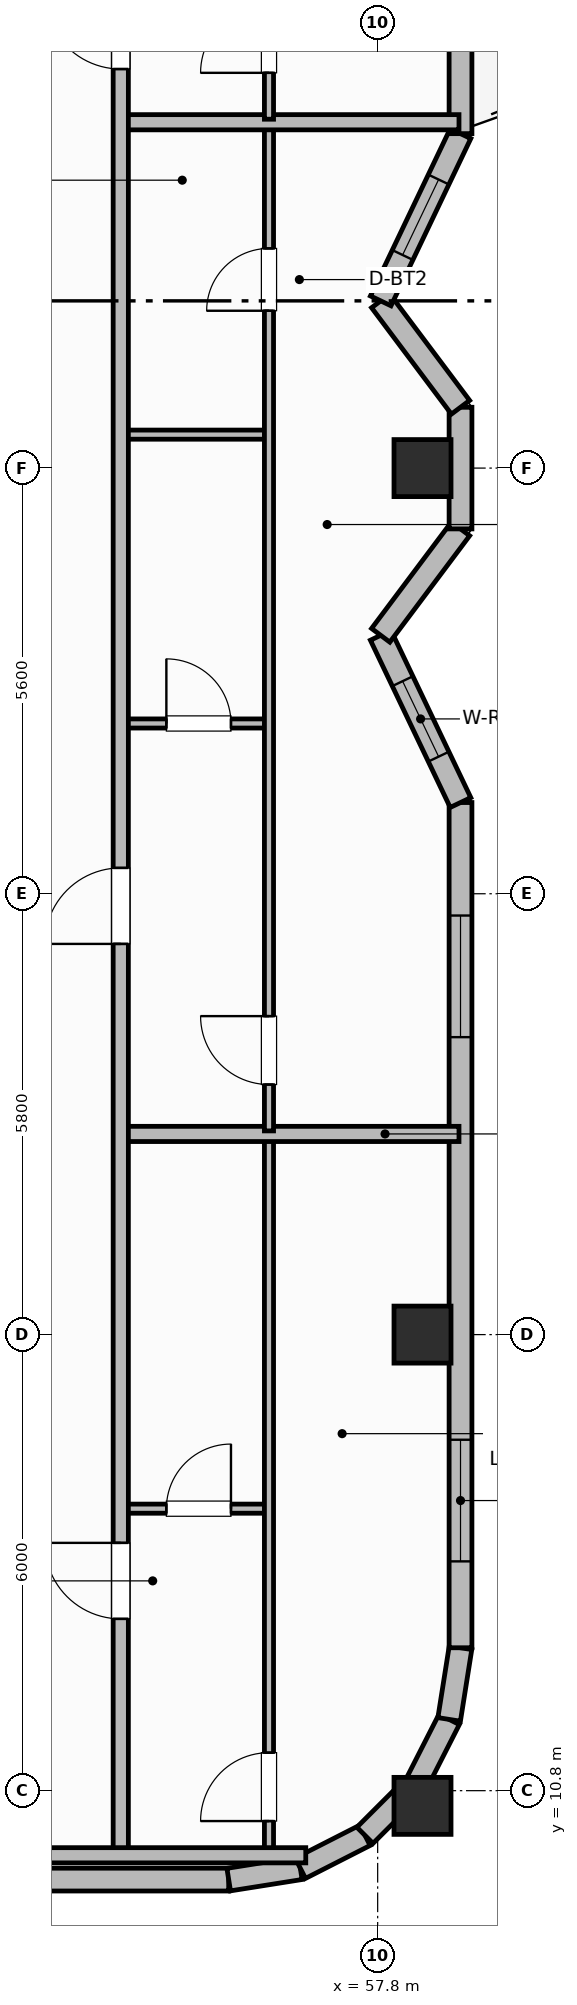
"""IFC4 building model, lengths in metres.
Left out: names, types, materials, properties, quantities, classifications, styles, units other than length and angle.
Written with IfcOpenShell. Run it as: python <this file> out.ifc"""

import sys

from ifc_helpers import new_model, si_unit, direction, frame, frame_2d, origin, origin_2d, place, context, subcontext, project, spatial, rectangle, extrude, element, fill, save


model = new_model("IFC4")
c1 = context("Model", 3, precision=1e-05, world=origin(), true_north=direction((0.0, 1.0)))
c2 = subcontext(c1, "Body", "Model", "MODEL_VIEW")
j1 = project(units=[si_unit("LENGTHUNIT", "METRE"), si_unit("PLANEANGLEUNIT", "RADIAN")], contexts=[c1])
p1 = place(None, origin())
s1 = spatial("IfcSite", under=j1, at=p1, CompositionType="ELEMENT")
p2 = place(p1, origin())
s2 = spatial("IfcBuilding", under=s1, at=p2, CompositionType="ELEMENT")
p3 = place(p2, frame((0.0, 0.0, 278.7)))
s3 = spatial("IfcBuildingStorey", under=s2, at=p3, CompositionType="ELEMENT", Elevation=278.7)
for number, where, z_axis, x_axis in (
    (1, (58.39, 10.6, 0.0), (0.0, 0.0, 1.0), (1.0, 0.0, 0.0)),
    (2, (58.39, 16.8, 0.0), (0.0, 0.0, 1.0), (1.0, 0.0, 0.0)),
    (3, (58.39, 28.2, 0.0), (0.0, 0.0, 1.0), (1.0, 0.0, 0.0)),
):
    element("IfcColumn", number, at=place(p3, frame(where, z_axis=z_axis, x_axis=x_axis)), inside=s3, PredefinedType="COLUMN", context=c2, shape_type="SweptSolid", body=[
        extrude(rectangle(XDim=0.75, YDim=0.75, at=origin_2d()), origin(), (0.0, 0.0, 1.0), 3.7),
    ])
p4 = place(p3, frame((22.56, 9.63, 0.0), z_axis=(0.0, 0.0, 1.0), x_axis=(1.0, 0.0, 0.0)))
e4 = element("IfcWall", 4, at=p4, inside=s3, PredefinedType="SOLIDWALL", context=c2, shape_type="SweptSolid", body=[
    extrude(rectangle(XDim=33.28, YDim=0.3, at=frame_2d((16.64, 0.0))), origin(), (0.0, 0.0, 1.0), 2.73),
])
p5 = place(p4, frame((5.08, 0.0, 0.76)))
e5 = element("IfcOpeningElement", 5, at=p5, cuts=e4, PredefinedType="OPENING", context=c2, shape_type="SweptSolid", body=[
    extrude(rectangle(XDim=1.8, YDim=1.85, at=frame_2d((0.9, 0.925))), frame((0.0, 0.16, 0.0), z_axis=(0.0, -1.0, 0.0), x_axis=(1.0, 0.0, 0.0)), (0.0, 0.0, 1.0), 0.32),
])
p6 = place(p4, frame((8.633, 0.0, 0.76)))
e6 = element("IfcOpeningElement", 6, at=p6, cuts=e4, PredefinedType="OPENING", context=c2, shape_type="SweptSolid", body=[
    extrude(rectangle(XDim=1.8, YDim=1.85, at=frame_2d((0.9, 0.925))), frame((0.0, 0.16, 0.0), z_axis=(0.0, -1.0, 0.0), x_axis=(1.0, 0.0, 0.0)), (0.0, 0.0, 1.0), 0.32),
])
p7 = place(p4, frame((15.74, 0.0, 0.76)))
e7 = element("IfcOpeningElement", 7, at=p7, cuts=e4, PredefinedType="OPENING", context=c2, shape_type="SweptSolid", body=[
    extrude(rectangle(XDim=1.8, YDim=1.85, at=frame_2d((0.9, 0.925))), frame((0.0, 0.16, 0.0), z_axis=(0.0, -1.0, 0.0), x_axis=(1.0, 0.0, 0.0)), (0.0, 0.0, 1.0), 0.32),
])
p8 = place(p4, frame((22.847, 0.0, 0.76)))
e8 = element("IfcOpeningElement", 8, at=p8, cuts=e4, PredefinedType="OPENING", context=c2, shape_type="SweptSolid", body=[
    extrude(rectangle(XDim=1.8, YDim=1.85, at=frame_2d((0.9, 0.925))), frame((0.0, 0.16, 0.0), z_axis=(0.0, -1.0, 0.0), x_axis=(1.0, 0.0, 0.0)), (0.0, 0.0, 1.0), 0.32),
])
p9 = place(p4, frame((26.4, 0.0, 0.76)))
e9 = element("IfcOpeningElement", 9, at=p9, cuts=e4, PredefinedType="OPENING", context=c2, shape_type="SweptSolid", body=[
    extrude(rectangle(XDim=1.8, YDim=1.85, at=frame_2d((0.9, 0.925))), frame((0.0, 0.16, 0.0), z_axis=(0.0, -1.0, 0.0), x_axis=(1.0, 0.0, 0.0)), (0.0, 0.0, 1.0), 0.32),
])
p10 = place(p3, frame((55.84, 9.63, 0.0), z_axis=(0.0, 0.0, 1.0), x_axis=(0.987663181641, 0.156593229835, 0.0)))
e10 = element("IfcWall", 10, at=p10, inside=s3, PredefinedType="SOLIDWALL", context=c2, shape_type="SweptSolid", body=[
    extrude(rectangle(XDim=0.954, YDim=0.3, at=frame_2d((0.477, 0.0))), origin(), (0.0, 0.0, 1.0), 2.73),
])
for number, where, z_axis, x_axis in (
    (11, (56.782, 9.779, 0.0), (0.0, 0.0, 1.0), (0.891, 0.454, 0.0)),
    (12, (57.633, 10.212, 0.0), (0.0, 0.0, 1.0), (0.707, 0.707, 0.0)),
    (13, (58.308, 10.887, 0.0), (0.0, 0.0, 1.0), (0.454, 0.891, 0.0)),
):
    element("IfcWall", number, at=place(p3, frame(where, z_axis=z_axis, x_axis=x_axis)), inside=s3, PredefinedType="SOLIDWALL", context=c2, shape_type="SweptSolid", body=[
        extrude(rectangle(XDim=0.954, YDim=0.3, at=frame_2d((0.477, 0.0))), origin(), (0.0, 0.0, 1.0), 2.73),
    ])
p11 = place(p3, frame((58.741, 11.738, 0.0), z_axis=(0.0, 0.0, 1.0), x_axis=(0.156343617883, 0.987702725088, 0.0)))
e14 = element("IfcWall", 14, at=p11, inside=s3, PredefinedType="SOLIDWALL", context=c2, shape_type="SweptSolid", body=[
    extrude(rectangle(XDim=0.954, YDim=0.3, at=frame_2d((0.477, 0.0))), origin(), (0.0, 0.0, 1.0), 2.73),
])
p12 = place(p3, frame((58.89, 12.68, 0.0), z_axis=(0.0, 0.0, 1.0), x_axis=(0.0, 1.0, 0.0)))
e15 = element("IfcWall", 15, at=p12, inside=s3, PredefinedType="SOLIDWALL", context=c2, shape_type="SweptSolid", body=[
    extrude(rectangle(XDim=11.12, YDim=0.3, at=frame_2d((5.56, 0.0))), origin(), (0.0, 0.0, 1.0), 2.73),
])
p13 = place(p12, frame((1.137, 0.0, 0.71)))
e16 = element("IfcOpeningElement", 16, at=p13, cuts=e15, PredefinedType="OPENING", context=c2, shape_type="SweptSolid", body=[
    extrude(rectangle(XDim=1.6, YDim=1.9, at=frame_2d((0.8, 0.95))), frame((0.0, 0.16, 0.0), z_axis=(0.0, -1.0, 0.0), x_axis=(1.0, 0.0, 0.0)), (0.0, 0.0, 1.0), 0.32),
])
p14 = place(p12, frame((8.033, 0.0, 0.71)))
e17 = element("IfcOpeningElement", 17, at=p14, cuts=e15, PredefinedType="OPENING", context=c2, shape_type="SweptSolid", body=[
    extrude(rectangle(XDim=1.6, YDim=1.9, at=frame_2d((0.8, 0.95))), frame((0.0, 0.16, 0.0), z_axis=(0.0, -1.0, 0.0), x_axis=(1.0, 0.0, 0.0)), (0.0, 0.0, 1.0), 0.32),
])
p15 = place(p3, frame((58.89, 23.8, 0.0), z_axis=(0.0, 0.0, 1.0), x_axis=(-0.430672112392, 0.902508466225, 0.0)))
e18 = element("IfcWall", 18, at=p15, inside=s3, PredefinedType="SOLIDWALL", context=c2, shape_type="SweptSolid", body=[
    extrude(rectangle(XDim=2.438, YDim=0.3, at=frame_2d((1.219, 0.0))), origin(), (0.0, 0.0, 1.0), 2.73),
])
p16 = place(p15, frame((0.669, 0.0, 0.92)))
e19 = element("IfcOpeningElement", 19, at=p16, cuts=e18, PredefinedType="OPENING", context=c2, shape_type="SweptSolid", body=[
    extrude(rectangle(XDim=1.1, YDim=1.65, at=frame_2d((0.55, 0.825))), frame((0.0, 0.16, 0.0), z_axis=(0.0, -1.0, 0.0), x_axis=(1.0, 0.0, 0.0)), (0.0, 0.0, 1.0), 0.32),
])
p17 = place(p3, frame((57.84, 26.0, 0.0), z_axis=(0.0, 0.0, 1.0), x_axis=(0.599955351225, 0.800033484634, 0.0)))
e20 = element("IfcWall", 20, at=p17, inside=s3, PredefinedType="SOLIDWALL", context=c2, shape_type="SweptSolid", body=[
    extrude(rectangle(XDim=1.75, YDim=0.3, at=frame_2d((0.875, 0.0))), origin(), (0.0, 0.0, 1.0), 2.73),
])
p18 = place(p3, frame((58.89, 27.4, 0.0), z_axis=(0.0, 0.0, 1.0), x_axis=(0.0, 1.0, 0.0)))
e21 = element("IfcWall", 21, at=p18, inside=s3, PredefinedType="SOLIDWALL", context=c2, shape_type="SweptSolid", body=[
    extrude(rectangle(XDim=1.6, YDim=0.3, at=frame_2d((0.8, 0.0))), origin(), (0.0, 0.0, 1.0), 2.73),
])
p19 = place(p3, frame((58.89, 29.0, 0.0), z_axis=(0.0, 0.0, 1.0), x_axis=(-0.599955351225, 0.800033484634, 0.0)))
e22 = element("IfcWall", 22, at=p19, inside=s3, PredefinedType="SOLIDWALL", context=c2, shape_type="SweptSolid", body=[
    extrude(rectangle(XDim=1.75, YDim=0.3, at=frame_2d((0.875, 0.0))), origin(), (0.0, 0.0, 1.0), 2.73),
])
p20 = place(p3, frame((57.84, 30.4, 0.0), z_axis=(0.0, 0.0, 1.0), x_axis=(0.430633186234, 0.902527040544, 0.0)))
e23 = element("IfcWall", 23, at=p20, inside=s3, PredefinedType="SOLIDWALL", context=c2, shape_type="SweptSolid", body=[
    extrude(rectangle(XDim=2.438, YDim=0.3, at=frame_2d((1.219, 0.0))), origin(), (0.0, 0.0, 1.0), 2.73),
])
p21 = place(p20, frame((0.669, 0.0, 0.92)))
e24 = element("IfcOpeningElement", 24, at=p21, cuts=e23, PredefinedType="OPENING", context=c2, shape_type="SweptSolid", body=[
    extrude(rectangle(XDim=1.1, YDim=1.65, at=frame_2d((0.55, 0.825))), frame((0.0, 0.16, 0.0), z_axis=(0.0, -1.0, 0.0), x_axis=(1.0, 0.0, 0.0)), (0.0, 0.0, 1.0), 0.32),
])
p22 = place(p3, frame((58.89, 32.6, 0.0), z_axis=(0.0, 0.0, 1.0), x_axis=(0.0, 1.0, 0.0)))
e25 = element("IfcWall", 25, at=p22, inside=s3, PredefinedType="SOLIDWALL", context=c2, shape_type="SweptSolid", body=[
    extrude(rectangle(XDim=11.12, YDim=0.3, at=frame_2d((5.56, 0.0))), origin(), (0.0, 0.0, 1.0), 2.73),
])
p23 = place(p22, frame((1.7, 0.0, 0.0)))
e26 = element("IfcOpeningElement", 26, at=p23, cuts=e25, PredefinedType="OPENING", context=c2, shape_type="SweptSolid", body=[
    extrude(rectangle(XDim=1.6, YDim=2.1, at=frame_2d((0.8, 1.05))), frame((0.0, 0.16, 0.0), z_axis=(0.0, -1.0, 0.0), x_axis=(1.0, 0.0, 0.0)), (0.0, 0.0, 1.0), 0.32),
])
p24 = place(p22, frame((3.81, 0.0, 0.76)))
e27 = element("IfcOpeningElement", 27, at=p24, cuts=e25, PredefinedType="OPENING", context=c2, shape_type="SweptSolid", body=[
    extrude(rectangle(XDim=1.4, YDim=1.85, at=frame_2d((0.7, 0.925))), frame((0.0, 0.16, 0.0), z_axis=(0.0, -1.0, 0.0), x_axis=(1.0, 0.0, 0.0)), (0.0, 0.0, 1.0), 0.32),
])
p25 = place(p22, frame((8.483, 0.0, 0.76)))
e28 = element("IfcOpeningElement", 28, at=p25, cuts=e25, PredefinedType="OPENING", context=c2, shape_type="SweptSolid", body=[
    extrude(rectangle(XDim=1.4, YDim=1.85, at=frame_2d((0.7, 0.925))), frame((0.0, 0.16, 0.0), z_axis=(0.0, -1.0, 0.0), x_axis=(1.0, 0.0, 0.0)), (0.0, 0.0, 1.0), 0.32),
])
p26 = place(p3, frame((54.42, 14.51, 0.0), z_axis=(0.0, 0.0, 1.0), x_axis=(1.0, 0.0, 0.0)))
e29 = element("IfcWall", 29, at=p26, inside=s3, PredefinedType="PARTITIONING", context=c2, shape_type="SweptSolid", body=[
    extrude(rectangle(XDim=1.95, YDim=0.12, at=frame_2d((0.975, 0.0))), origin(), (0.0, 0.0, 1.0), 2.56),
])
p27 = place(p26, frame((0.6, 0.0, 0.0)))
e30 = element("IfcOpeningElement", 30, at=p27, cuts=e29, PredefinedType="OPENING", context=c2, shape_type="SweptSolid", body=[
    extrude(rectangle(XDim=0.85, YDim=2.1, at=frame_2d((0.425, 1.05))), frame((0.0, 0.07, 0.0), z_axis=(0.0, -1.0, 0.0), x_axis=(1.0, 0.0, 0.0)), (0.0, 0.0, 1.0), 0.14),
])
p28 = place(p3, frame((56.37, 9.99, 0.0), z_axis=(0.0, 0.0, 1.0), x_axis=(0.0, 1.0, 0.0)))
e31 = element("IfcWall", 31, at=p28, inside=s3, PredefinedType="PARTITIONING", context=c2, shape_type="SweptSolid", body=[
    extrude(rectangle(XDim=9.41, YDim=0.12, at=frame_2d((4.705, 0.0))), origin(), (0.0, 0.0, 1.0), 2.56),
])
p29 = place(p28, frame((0.41, 0.0, 0.0)))
e32 = element("IfcOpeningElement", 32, at=p29, cuts=e31, PredefinedType="OPENING", context=c2, shape_type="SweptSolid", body=[
    extrude(rectangle(XDim=0.9, YDim=2.1, at=frame_2d((0.45, 1.05))), frame((0.0, 0.07, 0.0), z_axis=(0.0, -1.0, 0.0), x_axis=(1.0, 0.0, 0.0)), (0.0, 0.0, 1.0), 0.14),
])
p30 = place(p3, frame((54.42, 19.44, 0.0), z_axis=(0.0, 0.0, 1.0), x_axis=(1.0, 0.0, 0.0)))
e33 = element("IfcWall", 33, at=p30, inside=s3, PredefinedType="PARTITIONING", context=c2, shape_type="SweptSolid", body=[
    extrude(rectangle(XDim=4.45, YDim=0.2, at=frame_2d((2.225, 0.0))), origin(), (0.0, 0.0, 1.0), 2.56),
])
p31 = place(p3, frame((54.42, 24.84, 0.0), z_axis=(0.0, 0.0, 1.0), x_axis=(1.0, 0.0, 0.0)))
e34 = element("IfcWall", 34, at=p31, inside=s3, PredefinedType="PARTITIONING", context=c2, shape_type="SweptSolid", body=[
    extrude(rectangle(XDim=1.95, YDim=0.12, at=frame_2d((0.975, 0.0))), origin(), (0.0, 0.0, 1.0), 2.56),
])
p32 = place(p31, frame((0.6, 0.0, 0.0)))
e35 = element("IfcOpeningElement", 35, at=p32, cuts=e34, PredefinedType="OPENING", context=c2, shape_type="SweptSolid", body=[
    extrude(rectangle(XDim=0.85, YDim=2.1, at=frame_2d((0.425, 1.05))), frame((0.0, 0.07, 0.0), z_axis=(0.0, -1.0, 0.0), x_axis=(1.0, 0.0, 0.0)), (0.0, 0.0, 1.0), 0.14),
])
p33 = place(p3, frame((54.42, 28.64, 0.0), z_axis=(0.0, 0.0, 1.0), x_axis=(1.0, 0.0, 0.0)))
e36 = element("IfcWall", 36, at=p33, inside=s3, PredefinedType="PARTITIONING", context=c2, shape_type="SweptSolid", body=[
    extrude(rectangle(XDim=1.95, YDim=0.12, at=frame_2d((0.975, 0.0))), origin(), (0.0, 0.0, 1.0), 2.56),
])
p34 = place(p3, frame((56.37, 19.48, 0.0), z_axis=(0.0, 0.0, 1.0), x_axis=(0.0, 1.0, 0.0)))
e37 = element("IfcWall", 37, at=p34, inside=s3, PredefinedType="PARTITIONING", context=c2, shape_type="SweptSolid", body=[
    extrude(rectangle(XDim=13.23, YDim=0.12, at=frame_2d((6.615, 0.0))), origin(), (0.0, 0.0, 1.0), 2.56),
])
p35 = place(p34, frame((0.61, 0.0, 0.0)))
e38 = element("IfcOpeningElement", 38, at=p35, cuts=e37, PredefinedType="OPENING", context=c2, shape_type="SweptSolid", body=[
    extrude(rectangle(XDim=0.9, YDim=2.1, at=frame_2d((0.45, 1.05))), frame((0.0, 0.07, 0.0), z_axis=(0.0, -1.0, 0.0), x_axis=(1.0, 0.0, 0.0)), (0.0, 0.0, 1.0), 0.14),
])
p36 = place(p34, frame((10.79, 0.0, 0.0)))
e39 = element("IfcOpeningElement", 39, at=p36, cuts=e37, PredefinedType="OPENING", context=c2, shape_type="SweptSolid", body=[
    extrude(rectangle(XDim=0.82, YDim=2.08, at=frame_2d((0.41, 1.04))), frame((0.0, 0.07, 0.0), z_axis=(0.0, -1.0, 0.0), x_axis=(1.0, 0.0, 0.0)), (0.0, 0.0, 1.0), 0.14),
])
p37 = place(p3, frame((54.42, 32.75, 0.0), z_axis=(0.0, 0.0, 1.0), x_axis=(1.0, 0.0, 0.0)))
e40 = element("IfcWall", 40, at=p37, inside=s3, PredefinedType="PARTITIONING", context=c2, shape_type="SweptSolid", body=[
    extrude(rectangle(XDim=4.45, YDim=0.2, at=frame_2d((2.225, 0.0))), origin(), (0.0, 0.0, 1.0), 2.56),
])
p38 = place(p3, frame((56.37, 32.79, 0.0), z_axis=(0.0, 0.0, 1.0), x_axis=(0.0, 1.0, 0.0)))
e41 = element("IfcWall", 41, at=p38, inside=s3, PredefinedType="PARTITIONING", context=c2, shape_type="SweptSolid", body=[
    extrude(rectangle(XDim=5.42, YDim=0.12, at=frame_2d((2.71, 0.0))), origin(), (0.0, 0.0, 1.0), 2.56),
])
p39 = place(p38, frame((0.61, 0.0, 0.0)))
e42 = element("IfcOpeningElement", 42, at=p39, cuts=e41, PredefinedType="OPENING", context=c2, shape_type="SweptSolid", body=[
    extrude(rectangle(XDim=0.9, YDim=2.1, at=frame_2d((0.45, 1.05))), frame((0.0, 0.07, 0.0), z_axis=(0.0, -1.0, 0.0), x_axis=(1.0, 0.0, 0.0)), (0.0, 0.0, 1.0), 0.14),
])
p40 = place(p3, frame((54.42, 9.95, 0.0), z_axis=(0.0, 0.0, 1.0), x_axis=(0.0, 1.0, 0.0)))
e43 = element("IfcWall", 43, at=p40, inside=s3, PredefinedType="PARTITIONING", context=c2, shape_type="SweptSolid", body=[
    extrude(rectangle(XDim=36.5, YDim=0.2, at=frame_2d((18.25, 0.0))), origin(), (0.0, 0.0, 1.0), 2.56),
])
p41 = place(p40, frame((3.11, 0.0, 0.0)))
e44 = element("IfcOpeningElement", 44, at=p41, cuts=e43, PredefinedType="OPENING", context=c2, shape_type="SweptSolid", body=[
    extrude(rectangle(XDim=1.0, YDim=2.15, at=frame_2d((0.5, 1.075))), frame((0.0, 0.11, 0.0), z_axis=(0.0, -1.0, 0.0), x_axis=(1.0, 0.0, 0.0)), (0.0, 0.0, 1.0), 0.22),
])
p42 = place(p40, frame((11.99, 0.0, 0.0)))
e45 = element("IfcOpeningElement", 45, at=p42, cuts=e43, PredefinedType="OPENING", context=c2, shape_type="SweptSolid", body=[
    extrude(rectangle(XDim=1.0, YDim=2.15, at=frame_2d((0.5, 1.075))), frame((0.0, 0.11, 0.0), z_axis=(0.0, -1.0, 0.0), x_axis=(1.0, 0.0, 0.0)), (0.0, 0.0, 1.0), 0.22),
])
p43 = place(p40, frame((23.5, 0.0, 0.0)))
e46 = element("IfcOpeningElement", 46, at=p43, cuts=e43, PredefinedType="OPENING", context=c2, shape_type="SweptSolid", body=[
    extrude(rectangle(XDim=1.0, YDim=2.15, at=frame_2d((0.5, 1.075))), frame((0.0, 0.11, 0.0), z_axis=(0.0, -1.0, 0.0), x_axis=(1.0, 0.0, 0.0)), (0.0, 0.0, 1.0), 0.22),
])
p44 = place(p40, frame((31.2, 0.0, 0.0)))
e47 = element("IfcOpeningElement", 47, at=p44, cuts=e43, PredefinedType="OPENING", context=c2, shape_type="SweptSolid", body=[
    extrude(rectangle(XDim=1.0, YDim=2.15, at=frame_2d((0.5, 1.075))), frame((0.0, 0.11, 0.0), z_axis=(0.0, -1.0, 0.0), x_axis=(1.0, 0.0, 0.0)), (0.0, 0.0, 1.0), 0.22),
])
p45 = place(p3, frame((53.1, 9.95, 0.0), z_axis=(0.0, 0.0, 1.0), x_axis=(1.0, 0.0, 0.0)))
e48 = element("IfcWall", 48, at=p45, inside=s3, PredefinedType="PARTITIONING", context=c2, shape_type="SweptSolid", body=[
    extrude(rectangle(XDim=3.754, YDim=0.2, at=frame_2d((1.877, 0.0))), origin(), (0.0, 0.0, 1.0), 2.56),
])
p46 = place(p13, origin())
e49 = element("IfcWindow", 49, at=p46, inside=s3, PartitioningType="SINGLE_PANEL", PredefinedType="WINDOW", context=c2, shape_type="SweptSolid", body=[
    extrude(rectangle(XDim=1.6, YDim=1.9, at=frame_2d((0.8, 0.95))), frame((0.0, 0.03, 0.0), z_axis=(0.0, -1.0, 0.0), x_axis=(1.0, 0.0, 0.0)), (0.0, 0.0, 1.0), 0.06),
])
fill(e16, e49)
p47 = place(p14, origin())
e50 = element("IfcWindow", 50, at=p47, inside=s3, PartitioningType="SINGLE_PANEL", PredefinedType="WINDOW", context=c2, shape_type="SweptSolid", body=[
    extrude(rectangle(XDim=1.6, YDim=1.9, at=frame_2d((0.8, 0.95))), frame((0.0, 0.03, 0.0), z_axis=(0.0, -1.0, 0.0), x_axis=(1.0, 0.0, 0.0)), (0.0, 0.0, 1.0), 0.06),
])
fill(e17, e50)
p48 = place(p16, origin())
e51 = element("IfcWindow", 51, at=p48, inside=s3, PartitioningType="SINGLE_PANEL", PredefinedType="WINDOW", context=c2, shape_type="SweptSolid", body=[
    extrude(rectangle(XDim=1.1, YDim=1.65, at=frame_2d((0.55, 0.825))), frame((0.0, 0.03, 0.0), z_axis=(0.0, -1.0, 0.0), x_axis=(1.0, 0.0, 0.0)), (0.0, 0.0, 1.0), 0.06),
])
fill(e19, e51)
p49 = place(p21, origin())
e52 = element("IfcWindow", 52, at=p49, inside=s3, PartitioningType="SINGLE_PANEL", PredefinedType="WINDOW", context=c2, shape_type="SweptSolid", body=[
    extrude(rectangle(XDim=1.1, YDim=1.65, at=frame_2d((0.55, 0.825))), frame((0.0, 0.03, 0.0), z_axis=(0.0, -1.0, 0.0), x_axis=(1.0, 0.0, 0.0)), (0.0, 0.0, 1.0), 0.06),
])
fill(e24, e52)
p50 = place(p27, origin())
e53 = element("IfcDoor", 53, at=p50, inside=s3, OperationType="SINGLE_SWING_RIGHT", PredefinedType="DOOR", context=c2, shape_type="SweptSolid", body=[
    extrude(rectangle(XDim=0.85, YDim=2.1, at=frame_2d((0.425, 1.05))), frame((0.0, 0.025, 0.0), z_axis=(0.0, -1.0, 0.0), x_axis=(1.0, 0.0, 0.0)), (0.0, 0.0, 1.0), 0.05),
])
fill(e30, e53)
p51 = place(p29, origin())
e54 = element("IfcDoor", 54, at=p51, inside=s3, OperationType="SINGLE_SWING_LEFT", PredefinedType="DOOR", context=c2, shape_type="SweptSolid", body=[
    extrude(rectangle(XDim=0.9, YDim=2.1, at=frame_2d((0.45, 1.05))), frame((0.0, 0.025, 0.0), z_axis=(0.0, -1.0, 0.0), x_axis=(1.0, 0.0, 0.0)), (0.0, 0.0, 1.0), 0.05),
])
fill(e32, e54)
p52 = place(p32, origin())
e55 = element("IfcDoor", 55, at=p52, inside=s3, OperationType="SINGLE_SWING_LEFT", PredefinedType="DOOR", context=c2, shape_type="SweptSolid", body=[
    extrude(rectangle(XDim=0.85, YDim=2.1, at=frame_2d((0.425, 1.05))), frame((0.0, 0.025, 0.0), z_axis=(0.0, -1.0, 0.0), x_axis=(1.0, 0.0, 0.0)), (0.0, 0.0, 1.0), 0.05),
])
fill(e35, e55)
p53 = place(p35, origin())
e56 = element("IfcDoor", 56, at=p53, inside=s3, OperationType="SINGLE_SWING_RIGHT", PredefinedType="DOOR", context=c2, shape_type="SweptSolid", body=[
    extrude(rectangle(XDim=0.9, YDim=2.1, at=frame_2d((0.45, 1.05))), frame((0.0, 0.025, 0.0), z_axis=(0.0, -1.0, 0.0), x_axis=(1.0, 0.0, 0.0)), (0.0, 0.0, 1.0), 0.05),
])
fill(e38, e56)
p54 = place(p36, origin())
e57 = element("IfcDoor", 57, at=p54, inside=s3, OperationType="SINGLE_SWING_LEFT", PredefinedType="DOOR", context=c2, shape_type="SweptSolid", body=[
    extrude(rectangle(XDim=0.82, YDim=2.08, at=frame_2d((0.41, 1.04))), frame((0.0, 0.025, 0.0), z_axis=(0.0, -1.0, 0.0), x_axis=(1.0, 0.0, 0.0)), (0.0, 0.0, 1.0), 0.05),
])
fill(e39, e57)
p55 = place(p39, origin())
e58 = element("IfcDoor", 58, at=p55, inside=s3, OperationType="SINGLE_SWING_LEFT", PredefinedType="DOOR", context=c2, shape_type="SweptSolid", body=[
    extrude(rectangle(XDim=0.9, YDim=2.1, at=frame_2d((0.45, 1.05))), frame((0.0, 0.025, 0.0), z_axis=(0.0, -1.0, 0.0), x_axis=(1.0, 0.0, 0.0)), (0.0, 0.0, 1.0), 0.05),
])
fill(e42, e58)
p56 = place(p41, origin())
e59 = element("IfcDoor", 59, at=p56, inside=s3, OperationType="SINGLE_SWING_RIGHT", PredefinedType="DOOR", context=c2, shape_type="SweptSolid", body=[
    extrude(rectangle(XDim=1.0, YDim=2.15, at=frame_2d((0.5, 1.075))), frame((0.0, 0.025, 0.0), z_axis=(0.0, -1.0, 0.0), x_axis=(1.0, 0.0, 0.0)), (0.0, 0.0, 1.0), 0.05),
])
fill(e44, e59)
p57 = place(p42, origin())
e60 = element("IfcDoor", 60, at=p57, inside=s3, OperationType="SINGLE_SWING_LEFT", PredefinedType="DOOR", context=c2, shape_type="SweptSolid", body=[
    extrude(rectangle(XDim=1.0, YDim=2.15, at=frame_2d((0.5, 1.075))), frame((0.0, 0.025, 0.0), z_axis=(0.0, -1.0, 0.0), x_axis=(1.0, 0.0, 0.0)), (0.0, 0.0, 1.0), 0.05),
])
fill(e45, e60)
p58 = place(p43, origin())
e61 = element("IfcDoor", 61, at=p58, inside=s3, OperationType="SINGLE_SWING_RIGHT", PredefinedType="DOOR", context=c2, shape_type="SweptSolid", body=[
    extrude(rectangle(XDim=1.0, YDim=2.15, at=frame_2d((0.5, 1.075))), frame((0.0, 0.025, 0.0), z_axis=(0.0, -1.0, 0.0), x_axis=(1.0, 0.0, 0.0)), (0.0, 0.0, 1.0), 0.05),
])
fill(e46, e61)
save(model, sys.argv[1])
